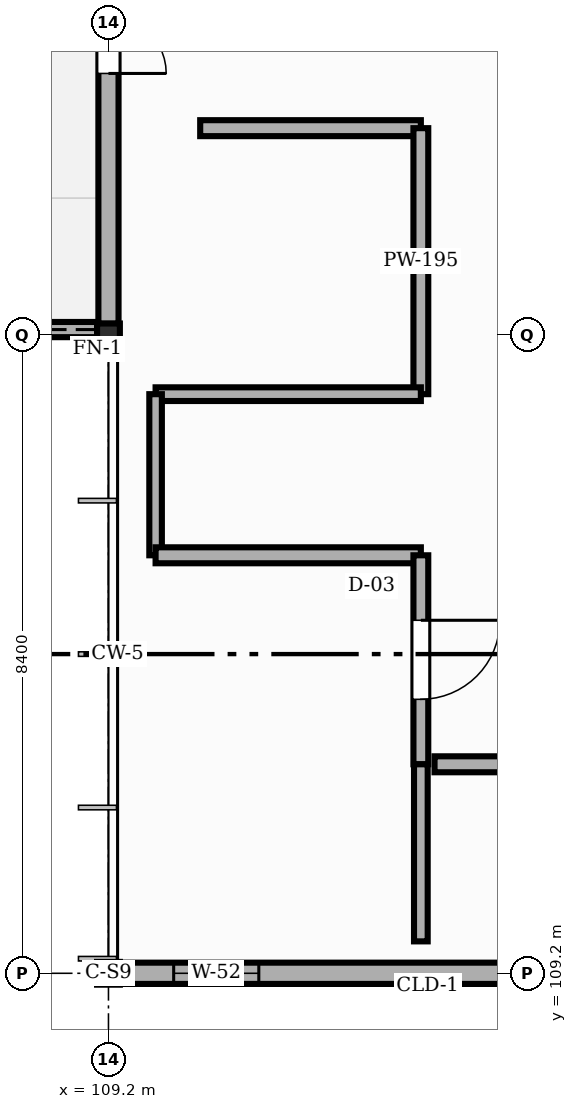
"""IFC4 building model, lengths in metres.
Left out: names, types, materials, properties, quantities, classifications, styles, units other than length and angle.
Written with IfcOpenShell. Run it as: python <this file> out.ifc"""

import sys

from ifc_helpers import new_model, si_unit, direction, frame, frame_2d, origin, origin_2d, place, context, subcontext, project, spatial, rectangle, i_section, extrude, element, fill, save


model = new_model("IFC4")
c1 = context("Model", 3, precision=1e-05, world=origin(), true_north=direction((0.0, 1.0)))
c2 = subcontext(c1, "Body", "Model", "MODEL_VIEW")
j1 = project(units=[si_unit("LENGTHUNIT", "METRE"), si_unit("PLANEANGLEUNIT", "RADIAN")], contexts=[c1])
p1 = place(None, origin())
s1 = spatial("IfcSite", under=j1, at=p1, CompositionType="ELEMENT")
p2 = place(p1, origin())
s2 = spatial("IfcBuilding", under=s1, at=p2, CompositionType="ELEMENT")
p3 = place(p2, frame((0.0, 0.0, 30.15)))
s3 = spatial("IfcBuildingStorey", under=s2, at=p3, CompositionType="ELEMENT", Elevation=30.15)
for number, where, z_axis, x_axis in (
    (1, (109.2, 109.2, 0.0), (0.0, 0.0, 1.0), (1.0, 0.0, 0.0)),
    (2, (109.2, 117.6, 0.0), (0.0, 0.0, 1.0), (1.0, 0.0, 0.0)),
):
    element("IfcColumn", number, at=place(p3, frame(where, z_axis=z_axis, x_axis=x_axis)), inside=s3, PredefinedType="COLUMN", context=c2, shape_type="SweptSolid", body=[
        extrude(i_section(OverallWidth=0.3, OverallDepth=0.3, WebThickness=0.011, FlangeThickness=0.019, FilletRadius=0.027, at=origin_2d()), origin(), (0.0, 0.0, 1.0), 4.2),
    ])
p4 = place(p3, frame((109.2, 125.854, 0.0), z_axis=(0.0, 0.0, 1.0), x_axis=(0.0, -1.0, 0.0)))
e3 = element("IfcWall", 3, at=p4, inside=s3, PredefinedType="STANDARD", context=c2, shape_type="SweptSolid", body=[
    extrude(rectangle(XDim=8.108, YDim=0.265, at=frame_2d((4.054, 0.0))), origin(), (0.0, 0.0, 1.0), 3.752),
])
p5 = place(p4, frame((3.294, 0.0, 0.0)))
e4 = element("IfcOpeningElement", 4, at=p5, cuts=e3, PredefinedType="OPENING", context=c2, shape_type="SweptSolid", body=[
    extrude(rectangle(XDim=1.52, YDim=2.2, at=frame_2d((0.76, 1.1))), frame((0.0, 0.142, 0.0), z_axis=(0.0, -1.0, 0.0), x_axis=(1.0, 0.0, 0.0)), (0.0, 0.0, 1.0), 0.285),
])
p6 = place(p3, frame((109.208, 109.2, 0.0), z_axis=(0.0, 0.0, 1.0), x_axis=(1.0, 0.0, 0.0)))
e5 = element("IfcWall", 5, at=p6, inside=s3, PredefinedType="STANDARD", context=c2, shape_type="SweptSolid", body=[
    extrude(rectangle(XDim=8.384, YDim=0.28, at=frame_2d((4.192, 0.0))), origin(), (0.0, 0.0, 1.0), 3.662),
])
p7 = place(p6, frame((0.85, 0.0, 0.9)))
e6 = element("IfcOpeningElement", 6, at=p7, cuts=e5, PredefinedType="OPENING", context=c2, shape_type="SweptSolid", body=[
    extrude(rectangle(XDim=1.12, YDim=2.05, at=frame_2d((0.56, 1.025))), frame((0.0, 0.15, 0.0), z_axis=(0.0, -1.0, 0.0), x_axis=(1.0, 0.0, 0.0)), (0.0, 0.0, 1.0), 0.3),
])
p8 = place(p6, frame((6.314, 0.0, 0.9)))
e7 = element("IfcOpeningElement", 7, at=p8, cuts=e5, PredefinedType="OPENING", context=c2, shape_type="SweptSolid", body=[
    extrude(rectangle(XDim=1.22, YDim=2.05, at=frame_2d((0.61, 1.025))), frame((0.0, 0.15, 0.0), z_axis=(0.0, -1.0, 0.0), x_axis=(1.0, 0.0, 0.0)), (0.0, 0.0, 1.0), 0.3),
])
p9 = place(p3, frame((104.06, 117.67, 0.0), z_axis=(0.0, 0.0, 1.0), x_axis=(1.0, 0.0, 0.0)))
e8 = element("IfcWall", 8, at=p9, inside=s3, PredefinedType="PARAPET", context=c2, shape_type="SweptSolid", body=[
    extrude(rectangle(XDim=5.0, YDim=0.2, at=frame_2d((2.5, 0.0))), origin(), (0.0, 0.0, 1.0), 0.22),
])
p10 = place(p3, frame((110.407, 120.32, -0.004), z_axis=(0.0, 0.0, 1.0), x_axis=(1.0, 0.0, 0.0)))
e9 = element("IfcWall", 9, at=p10, inside=s3, PredefinedType="STANDARD", context=c2, shape_type="SweptSolid", body=[
    extrude(rectangle(XDim=2.903, YDim=0.21, at=frame_2d((1.452, 0.0))), origin(), (0.0, 0.0, 1.0), 4.004),
])
p11 = place(p3, frame((113.31, 120.32, -0.004), z_axis=(0.0, 0.0, 1.0), x_axis=(0.0, -1.0, 0.0)))
e10 = element("IfcWall", 10, at=p11, inside=s3, PredefinedType="STANDARD", context=c2, shape_type="SweptSolid", body=[
    extrude(rectangle(XDim=3.5, YDim=0.195, at=frame_2d((1.75, 0.0))), origin(), (0.0, 0.0, 1.0), 4.004),
])
p12 = place(p3, frame((113.31, 116.82, -0.004), z_axis=(0.0, 0.0, 1.0), x_axis=(-1.0, 0.0, 0.0)))
e11 = element("IfcWall", 11, at=p12, inside=s3, PredefinedType="STANDARD", context=c2, shape_type="SweptSolid", body=[
    extrude(rectangle(XDim=3.49, YDim=0.18, at=frame_2d((1.745, 0.0))), origin(), (0.0, 0.0, 1.0), 4.004),
])
p13 = place(p3, frame((109.82, 116.82, -0.004), z_axis=(0.0, 0.0, 1.0), x_axis=(0.0, -1.0, 0.0)))
e12 = element("IfcWall", 12, at=p13, inside=s3, PredefinedType="STANDARD", context=c2, shape_type="SweptSolid", body=[
    extrude(rectangle(XDim=2.12, YDim=0.165, at=frame_2d((1.06, 0.0))), origin(), (0.0, 0.0, 1.0), 4.004),
])
p14 = place(p3, frame((109.82, 114.7, -0.004), z_axis=(0.0, 0.0, 1.0), x_axis=(1.0, 0.0, 0.0)))
e13 = element("IfcWall", 13, at=p14, inside=s3, PredefinedType="STANDARD", context=c2, shape_type="SweptSolid", body=[
    extrude(rectangle(XDim=3.49, YDim=0.21, at=frame_2d((1.745, 0.0))), origin(), (0.0, 0.0, 1.0), 4.004),
])
p15 = place(p3, frame((113.31, 114.7, -0.004), z_axis=(0.0, 0.0, 1.0), x_axis=(0.0, -1.0, 0.0)))
e14 = element("IfcWall", 14, at=p15, inside=s3, PredefinedType="STANDARD", context=c2, shape_type="SweptSolid", body=[
    extrude(rectangle(XDim=2.75, YDim=0.195, at=frame_2d((1.375, 0.0))), origin(), (0.0, 0.0, 1.0), 4.004),
])
p16 = place(p15, frame((0.855, 0.0, 0.0)))
e15 = element("IfcOpeningElement", 15, at=p16, cuts=e14, PredefinedType="OPENING", context=c2, shape_type="SweptSolid", body=[
    extrude(rectangle(XDim=1.04, YDim=2.06, at=frame_2d((0.52, 1.03))), frame((0.0, 0.107, 0.0), z_axis=(0.0, -1.0, 0.0), x_axis=(1.0, 0.0, 0.0)), (0.0, 0.0, 1.0), 0.215),
])
p17 = place(p3, frame((113.31, 111.95, -0.004), z_axis=(0.0, 0.0, 1.0), x_axis=(0.0, -1.0, 0.0)))
e16 = element("IfcWall", 16, at=p17, inside=s3, PredefinedType="STANDARD", context=c2, shape_type="SweptSolid", body=[
    extrude(rectangle(XDim=2.33, YDim=0.18, at=frame_2d((1.165, 0.0))), origin(), (0.0, 0.0, 1.0), 4.004),
])
p18 = place(p3, frame((113.49, 111.95, -0.004), z_axis=(0.0, 0.0, 1.0), x_axis=(1.0, 0.0, 0.0)))
e17 = element("IfcWall", 17, at=p18, inside=s3, PredefinedType="STANDARD", context=c2, shape_type="SweptSolid", body=[
    extrude(rectangle(XDim=12.42, YDim=0.21, at=frame_2d((6.21, 0.0))), origin(), (0.0, 0.0, 1.0), 4.004),
])
p19 = place(p18, frame((7.483, 0.0, 0.0)))
e18 = element("IfcOpeningElement", 18, at=p19, cuts=e17, PredefinedType="OPENING", context=c2, shape_type="SweptSolid", body=[
    extrude(rectangle(XDim=1.18, YDim=2.06, at=frame_2d((0.59, 1.03))), frame((0.0, 0.115, 0.0), z_axis=(0.0, -1.0, 0.0), x_axis=(1.0, 0.0, 0.0)), (0.0, 0.0, 1.0), 0.23),
])
p20 = place(p5, origin())
e19 = element("IfcDoor", 19, at=p20, inside=s3, OperationType="DOUBLE_DOOR_SINGLE_SWING", PredefinedType="DOOR", context=c2, shape_type="SweptSolid", body=[
    extrude(rectangle(XDim=1.52, YDim=2.2, at=frame_2d((0.76, 1.1))), frame((0.0, 0.025, 0.0), z_axis=(0.0, -1.0, 0.0), x_axis=(1.0, 0.0, 0.0)), (0.0, 0.0, 1.0), 0.05),
])
fill(e4, e19)
p21 = place(p7, origin())
e20 = element("IfcWindow", 20, at=p21, inside=s3, PartitioningType="SINGLE_PANEL", PredefinedType="WINDOW", context=c2, shape_type="SweptSolid", body=[
    extrude(rectangle(XDim=1.12, YDim=2.05, at=frame_2d((0.56, 1.025))), frame((0.0, 0.03, 0.0), z_axis=(0.0, -1.0, 0.0), x_axis=(1.0, 0.0, 0.0)), (0.0, 0.0, 1.0), 0.06),
])
fill(e6, e20)
p22 = place(p16, origin())
e21 = element("IfcDoor", 21, at=p22, inside=s3, OperationType="SINGLE_SWING_LEFT", PredefinedType="DOOR", context=c2, shape_type="SweptSolid", body=[
    extrude(rectangle(XDim=1.04, YDim=2.06, at=frame_2d((0.52, 1.03))), frame((0.0, 0.025, 0.0), z_axis=(0.0, -1.0, 0.0), x_axis=(1.0, 0.0, 0.0)), (0.0, 0.0, 1.0), 0.05),
])
fill(e15, e21)
save(model, sys.argv[1])
